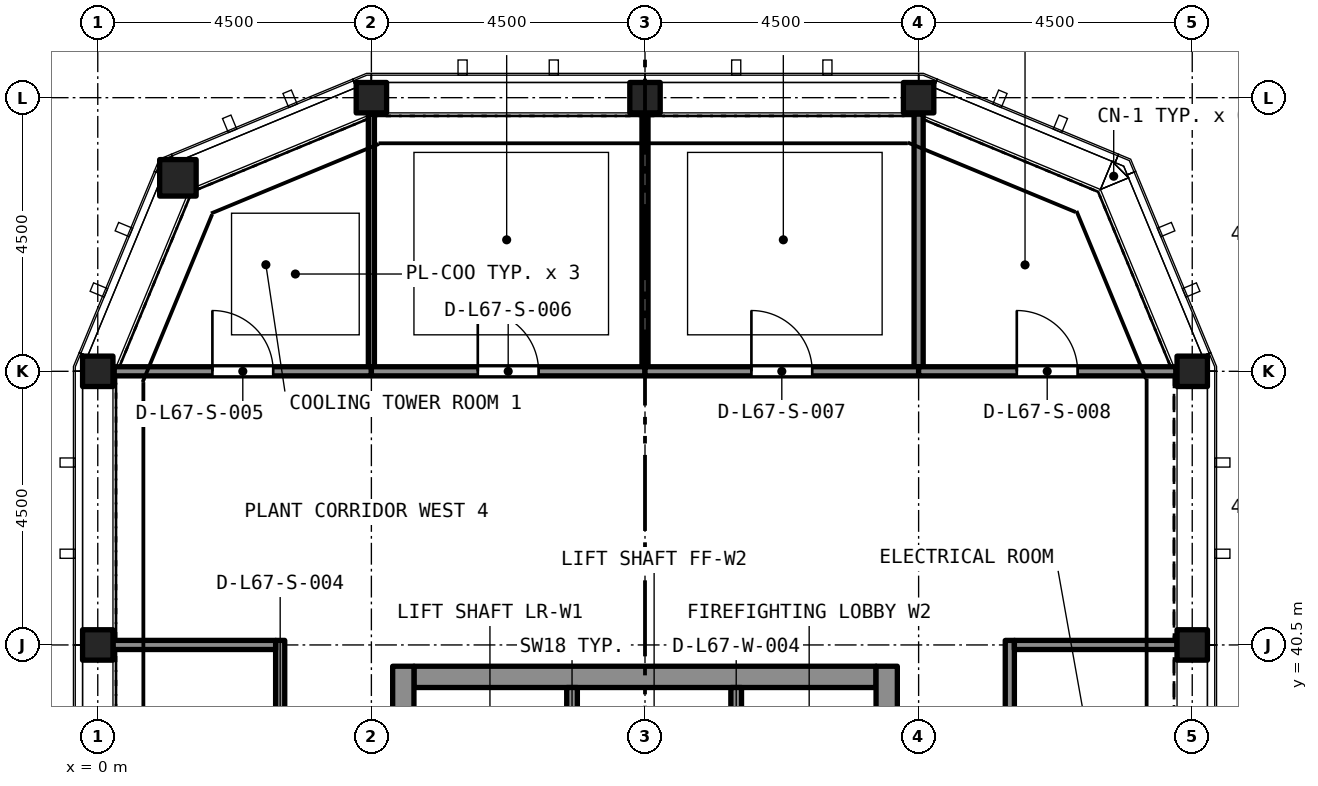
"""IFC4 building model, lengths in metres.
Left out: names, types, materials, properties, quantities, classifications, styles, units other than length and angle.
Written with IfcOpenShell. Run it as: python <this file> out.ifc"""

import sys

from ifc_helpers import new_model, si_unit, direction, frame, frame_2d, origin, origin_2d, place, context, subcontext, project, spatial, rectangle, hollow_rectangle, extrude, element, fill, save


model = new_model("IFC4")
c1 = context("Model", 3, precision=1e-05, world=origin(), true_north=direction((0.0, 1.0)))
c2 = subcontext(c1, "Body", "Model", "MODEL_VIEW")
j1 = project(units=[si_unit("LENGTHUNIT", "METRE"), si_unit("PLANEANGLEUNIT", "RADIAN")], contexts=[c1])
p1 = place(None, origin())
s1 = spatial("IfcSite", under=j1, at=p1, CompositionType="ELEMENT")
p2 = place(p1, origin())
s2 = spatial("IfcBuilding", under=s1, at=p2, CompositionType="ELEMENT")
p3 = place(p2, frame((0.0, 0.0, 247.095)))
s3 = spatial("IfcBuildingStorey", under=s2, at=p3, CompositionType="ELEMENT", Elevation=247.095)
p4 = place(p3, frame((5.2, 39.975, 0.0), z_axis=(0.0, 0.0, 1.0), x_axis=(1.0, 0.0, 0.0)))
e1 = element("IfcWall", 1, at=p4, inside=s3, PredefinedType="SOLIDWALL", context=c2, shape_type="SweptSolid", body=[
    extrude(rectangle(XDim=7.6, YDim=0.35, at=frame_2d((3.8, 0.0))), origin(), (0.0, 0.0, 1.0), 11.4),
])
p5 = place(p3, frame((5.025, 27.35, 0.0), z_axis=(0.0, 0.0, 1.0), x_axis=(0.0, 1.0, 0.0)))
e2 = element("IfcWall", 2, at=p5, inside=s3, PredefinedType="SOLIDWALL", context=c2, shape_type="SweptSolid", body=[
    extrude(rectangle(XDim=12.8, YDim=0.35, at=frame_2d((6.4, 0.0))), origin(), (0.0, 0.0, 1.0), 11.4),
])
p6 = place(p5, frame((8.6, 0.0, 0.0)))
e3 = element("IfcOpeningElement", 3, at=p6, cuts=e2, PredefinedType="OPENING", context=c2, shape_type="SweptSolid", body=[
    extrude(rectangle(XDim=1.2, YDim=2.1, at=frame_2d((0.6, 1.05))), frame((0.0, 0.185, 0.0), z_axis=(0.0, -1.0, 0.0), x_axis=(1.0, 0.0, 0.0)), (0.0, 0.0, 1.0), 0.37),
])
p7 = place(p3, frame((12.975, 27.35, 0.0), z_axis=(0.0, 0.0, 1.0), x_axis=(0.0, 1.0, 0.0)))
e4 = element("IfcWall", 4, at=p7, inside=s3, PredefinedType="SOLIDWALL", context=c2, shape_type="SweptSolid", body=[
    extrude(rectangle(XDim=12.8, YDim=0.35, at=frame_2d((6.4, 0.0))), origin(), (0.0, 0.0, 1.0), 11.4),
])
p8 = place(p7, frame((10.75, 0.0, 0.0)))
e5 = element("IfcOpeningElement", 5, at=p8, cuts=e4, PredefinedType="OPENING", context=c2, shape_type="SweptSolid", body=[
    extrude(rectangle(XDim=1.1, YDim=2.1, at=frame_2d((0.55, 1.05))), frame((0.0, 0.185, 0.0), z_axis=(0.0, -1.0, 0.0), x_axis=(1.0, 0.0, 0.0)), (0.0, 0.0, 1.0), 0.37),
])
p9 = place(p7, frame((8.6, 0.0, 0.0)))
e6 = element("IfcOpeningElement", 6, at=p9, cuts=e4, PredefinedType="OPENING", context=c2, shape_type="SweptSolid", body=[
    extrude(rectangle(XDim=1.2, YDim=2.1, at=frame_2d((0.6, 1.05))), frame((0.0, 0.185, 0.0), z_axis=(0.0, -1.0, 0.0), x_axis=(1.0, 0.0, 0.0)), (0.0, 0.0, 1.0), 0.37),
])
for number, where, z_axis, x_axis in (
    (7, (0.0, 40.5, 0.0), (0.0, 0.0, 1.0), (1.0, 0.0, 0.0)),
    (8, (18.0, 40.5, 0.0), (0.0, 0.0, 1.0), (1.0, 0.0, 0.0)),
    (9, (0.0, 45.0, 0.0), (0.0, 0.0, 1.0), (1.0, 0.0, 0.0)),
    (10, (18.0, 45.0, 0.0), (0.0, 0.0, 1.0), (1.0, 0.0, 0.0)),
):
    element("IfcColumn", number, at=place(p3, frame(where, z_axis=z_axis, x_axis=x_axis)), inside=s3, PredefinedType="COLUMN", context=c2, shape_type="SweptSolid", body=[
        extrude(hollow_rectangle(XDim=0.5, YDim=0.5, WallThickness=0.025, at=origin_2d()), origin(), (0.0, 0.0, 1.0), 11.37),
    ])
p10 = place(p3, frame((1.318, 48.182, 0.0), z_axis=(0.0, 0.0, 1.0), x_axis=(1.0, 0.0, 0.0)))
e11 = element("IfcColumn", 11, at=p10, inside=s3, PredefinedType="COLUMN", context=c2, shape_type="SweptSolid", body=[
    extrude(hollow_rectangle(XDim=0.6, YDim=0.6, WallThickness=0.03, at=origin_2d()), origin(), (0.0, 0.0, 1.0), 11.37),
])
for number, where, z_axis, x_axis in (
    (12, (4.5, 49.5, 0.0), (0.0, 0.0, 1.0), (1.0, 0.0, 0.0)),
    (13, (9.0, 49.5, 0.0), (0.0, 0.0, 1.0), (1.0, 0.0, 0.0)),
    (14, (13.5, 49.5, 0.0), (0.0, 0.0, 1.0), (1.0, 0.0, 0.0)),
):
    element("IfcColumn", number, at=place(p3, frame(where, z_axis=z_axis, x_axis=x_axis)), inside=s3, PredefinedType="COLUMN", context=c2, shape_type="SweptSolid", body=[
        extrude(hollow_rectangle(XDim=0.5, YDim=0.5, WallThickness=0.025, at=origin_2d()), origin(), (0.0, 0.0, 1.0), 11.37),
    ])
p11 = place(p3, frame((7.8, 37.5, 0.0), z_axis=(0.0, 0.0, 1.0), x_axis=(0.0, 1.0, 0.0)))
e15 = element("IfcWall", 15, at=p11, inside=s3, PredefinedType="SOLIDWALL", context=c2, shape_type="SweptSolid", body=[
    extrude(rectangle(XDim=2.3, YDim=0.175, at=frame_2d((1.15, 0.0))), origin(), (0.0, 0.0, 1.0), 9.8),
])
p12 = place(p3, frame((10.5, 37.5, 0.0), z_axis=(0.0, 0.0, 1.0), x_axis=(0.0, 1.0, 0.0)))
e16 = element("IfcWall", 16, at=p12, inside=s3, PredefinedType="SOLIDWALL", context=c2, shape_type="SweptSolid", body=[
    extrude(rectangle(XDim=2.3, YDim=0.175, at=frame_2d((1.15, 0.0))), origin(), (0.0, 0.0, 1.0), 9.8),
])
p13 = place(p12, frame((0.65, 0.0, 0.0)))
e17 = element("IfcOpeningElement", 17, at=p13, cuts=e16, PredefinedType="OPENING", context=c2, shape_type="SweptSolid", body=[
    extrude(rectangle(XDim=1.0, YDim=2.1, at=frame_2d((0.5, 1.05))), frame((0.0, 0.097, 0.0), z_axis=(0.0, -1.0, 0.0), x_axis=(1.0, 0.0, 0.0)), (0.0, 0.0, 1.0), 0.195),
])
p14 = place(p3, frame((15.0, 40.575, 0.0), z_axis=(0.0, 0.0, 1.0), x_axis=(0.0, -1.0, 0.0)))
e18 = element("IfcWall", 18, at=p14, inside=s3, PredefinedType="PARTITIONING", context=c2, shape_type="SweptSolid", body=[
    extrude(rectangle(XDim=4.575, YDim=0.15, at=frame_2d((2.288, 0.0))), origin(), (0.0, 0.0, 1.0), 9.8),
])
p15 = place(p14, frame((1.825, 0.0, 0.0)))
e19 = element("IfcOpeningElement", 19, at=p15, cuts=e18, PredefinedType="OPENING", context=c2, shape_type="SweptSolid", body=[
    extrude(rectangle(XDim=1.0, YDim=2.1, at=frame_2d((0.5, 1.05))), frame((0.0, 0.085, 0.0), z_axis=(0.0, -1.0, 0.0), x_axis=(1.0, 0.0, 0.0)), (0.0, 0.0, 1.0), 0.17),
])
p16 = place(p3, frame((3.0, 36.0, 0.0), z_axis=(0.0, 0.0, 1.0), x_axis=(0.0, 1.0, 0.0)))
e20 = element("IfcWall", 20, at=p16, inside=s3, PredefinedType="PARTITIONING", context=c2, shape_type="SweptSolid", body=[
    extrude(rectangle(XDim=4.575, YDim=0.15, at=frame_2d((2.288, 0.0))), origin(), (0.0, 0.0, 1.0), 9.8),
])
p17 = place(p16, frame((1.75, 0.0, 0.0)))
e21 = element("IfcOpeningElement", 21, at=p17, cuts=e20, PredefinedType="OPENING", context=c2, shape_type="SweptSolid", body=[
    extrude(rectangle(XDim=1.0, YDim=2.1, at=frame_2d((0.5, 1.05))), frame((0.0, 0.085, 0.0), z_axis=(0.0, -1.0, 0.0), x_axis=(1.0, 0.0, 0.0)), (0.0, 0.0, 1.0), 0.17),
])
p18 = place(p3, frame((4.5, 45.075, 0.0), z_axis=(0.0, 0.0, 1.0), x_axis=(0.0, 1.0, 0.0)))
e22 = element("IfcWall", 22, at=p18, inside=s3, PredefinedType="PARTITIONING", context=c2, shape_type="SweptSolid", body=[
    extrude(rectangle(XDim=4.155, YDim=0.1, at=frame_2d((2.077, 0.0))), origin(), (0.0, 0.0, 1.0), 9.8),
])
p19 = place(p3, frame((0.271, 45.0, 0.0), z_axis=(0.0, 0.0, 1.0), x_axis=(1.0, 0.0, 0.0)))
e23 = element("IfcWall", 23, at=p19, inside=s3, PredefinedType="PARTITIONING", context=c2, shape_type="SweptSolid", body=[
    extrude(rectangle(XDim=4.229, YDim=0.15, at=frame_2d((2.115, 0.0))), origin(), (0.0, 0.0, 1.0), 9.8),
])
p20 = place(p19, frame((1.615, 0.0, 0.0)))
e24 = element("IfcOpeningElement", 24, at=p20, cuts=e23, PredefinedType="OPENING", context=c2, shape_type="SweptSolid", body=[
    extrude(rectangle(XDim=1.0, YDim=2.1, at=frame_2d((0.5, 1.05))), frame((0.0, 0.085, 0.0), z_axis=(0.0, -1.0, 0.0), x_axis=(1.0, 0.0, 0.0)), (0.0, 0.0, 1.0), 0.17),
])
p21 = place(p3, frame((9.0, 45.075, 0.0), z_axis=(0.0, 0.0, 1.0), x_axis=(0.0, 1.0, 0.0)))
e25 = element("IfcWall", 25, at=p21, inside=s3, PredefinedType="PARTITIONING", context=c2, shape_type="SweptSolid", body=[
    extrude(rectangle(XDim=4.175, YDim=0.1, at=frame_2d((2.087, 0.0))), origin(), (0.0, 0.0, 1.0), 9.8),
])
p22 = place(p3, frame((4.5, 45.0, 0.0), z_axis=(0.0, 0.0, 1.0), x_axis=(1.0, 0.0, 0.0)))
e26 = element("IfcWall", 26, at=p22, inside=s3, PredefinedType="PARTITIONING", context=c2, shape_type="SweptSolid", body=[
    extrude(rectangle(XDim=4.5, YDim=0.15, at=frame_2d((2.25, 0.0))), origin(), (0.0, 0.0, 1.0), 9.8),
])
p23 = place(p22, frame((1.75, 0.0, 0.0)))
e27 = element("IfcOpeningElement", 27, at=p23, cuts=e26, PredefinedType="OPENING", context=c2, shape_type="SweptSolid", body=[
    extrude(rectangle(XDim=1.0, YDim=2.1, at=frame_2d((0.5, 1.05))), frame((0.0, 0.085, 0.0), z_axis=(0.0, -1.0, 0.0), x_axis=(1.0, 0.0, 0.0)), (0.0, 0.0, 1.0), 0.17),
])
p24 = place(p3, frame((13.5, 45.075, 0.0), z_axis=(0.0, 0.0, 1.0), x_axis=(0.0, 1.0, 0.0)))
e28 = element("IfcWall", 28, at=p24, inside=s3, PredefinedType="PARTITIONING", context=c2, shape_type="SweptSolid", body=[
    extrude(rectangle(XDim=4.155, YDim=0.15, at=frame_2d((2.077, 0.0))), origin(), (0.0, 0.0, 1.0), 9.8),
])
p25 = place(p3, frame((9.0, 45.0, 0.0), z_axis=(0.0, 0.0, 1.0), x_axis=(1.0, 0.0, 0.0)))
e29 = element("IfcWall", 29, at=p25, inside=s3, PredefinedType="PARTITIONING", context=c2, shape_type="SweptSolid", body=[
    extrude(rectangle(XDim=4.5, YDim=0.15, at=frame_2d((2.25, 0.0))), origin(), (0.0, 0.0, 1.0), 9.8),
])
p26 = place(p25, frame((1.75, 0.0, 0.0)))
e30 = element("IfcOpeningElement", 30, at=p26, cuts=e29, PredefinedType="OPENING", context=c2, shape_type="SweptSolid", body=[
    extrude(rectangle(XDim=1.0, YDim=2.1, at=frame_2d((0.5, 1.05))), frame((0.0, 0.085, 0.0), z_axis=(0.0, -1.0, 0.0), x_axis=(1.0, 0.0, 0.0)), (0.0, 0.0, 1.0), 0.17),
])
p27 = place(p3, frame((13.5, 45.0, 0.0), z_axis=(0.0, 0.0, 1.0), x_axis=(1.0, 0.0, 0.0)))
e31 = element("IfcWall", 31, at=p27, inside=s3, PredefinedType="PARTITIONING", context=c2, shape_type="SweptSolid", body=[
    extrude(rectangle(XDim=4.229, YDim=0.15, at=frame_2d((2.115, 0.0))), origin(), (0.0, 0.0, 1.0), 9.8),
])
p28 = place(p27, frame((1.615, 0.0, 0.0)))
e32 = element("IfcOpeningElement", 32, at=p28, cuts=e31, PredefinedType="OPENING", context=c2, shape_type="SweptSolid", body=[
    extrude(rectangle(XDim=1.0, YDim=2.1, at=frame_2d((0.5, 1.05))), frame((0.0, 0.085, 0.0), z_axis=(0.0, -1.0, 0.0), x_axis=(1.0, 0.0, 0.0)), (0.0, 0.0, 1.0), 0.17),
])
for number, where, z_axis, x_axis in (
    (33, (15.075, 40.5, 0.0), (0.0, 0.0, 1.0), (1.0, 0.0, 0.0)),
    (34, (0.25, 40.5, 0.0), (0.0, 0.0, 1.0), (1.0, 0.0, 0.0)),
):
    element("IfcWall", number, at=place(p3, frame(where, z_axis=z_axis, x_axis=x_axis)), inside=s3, PredefinedType="PARTITIONING", context=c2, shape_type="SweptSolid", body=[
        extrude(rectangle(XDim=2.675, YDim=0.15, at=frame_2d((1.337, 0.0))), origin(), (0.0, 0.0, 1.0), 9.8),
    ])
p29 = place(p20, origin())
e35 = element("IfcDoor", 35, at=p29, inside=s3, OperationType="SINGLE_SWING_RIGHT", PredefinedType="DOOR", context=c2, shape_type="SweptSolid", body=[
    extrude(rectangle(XDim=1.0, YDim=2.1, at=frame_2d((0.5, 1.05))), frame((0.0, 0.025, 0.0), z_axis=(0.0, -1.0, 0.0), x_axis=(1.0, 0.0, 0.0)), (0.0, 0.0, 1.0), 0.05),
])
fill(e24, e35)
p30 = place(p23, origin())
e36 = element("IfcDoor", 36, at=p30, inside=s3, OperationType="SINGLE_SWING_RIGHT", PredefinedType="DOOR", context=c2, shape_type="SweptSolid", body=[
    extrude(rectangle(XDim=1.0, YDim=2.1, at=frame_2d((0.5, 1.05))), frame((0.0, 0.025, 0.0), z_axis=(0.0, -1.0, 0.0), x_axis=(1.0, 0.0, 0.0)), (0.0, 0.0, 1.0), 0.05),
])
fill(e27, e36)
p31 = place(p26, origin())
e37 = element("IfcDoor", 37, at=p31, inside=s3, OperationType="SINGLE_SWING_RIGHT", PredefinedType="DOOR", context=c2, shape_type="SweptSolid", body=[
    extrude(rectangle(XDim=1.0, YDim=2.1, at=frame_2d((0.5, 1.05))), frame((0.0, 0.025, 0.0), z_axis=(0.0, -1.0, 0.0), x_axis=(1.0, 0.0, 0.0)), (0.0, 0.0, 1.0), 0.05),
])
fill(e30, e37)
p32 = place(p28, origin())
e38 = element("IfcDoor", 38, at=p32, inside=s3, OperationType="SINGLE_SWING_RIGHT", PredefinedType="DOOR", context=c2, shape_type="SweptSolid", body=[
    extrude(rectangle(XDim=1.0, YDim=2.1, at=frame_2d((0.5, 1.05))), frame((0.0, 0.025, 0.0), z_axis=(0.0, -1.0, 0.0), x_axis=(1.0, 0.0, 0.0)), (0.0, 0.0, 1.0), 0.05),
])
fill(e32, e38)
save(model, sys.argv[1])
